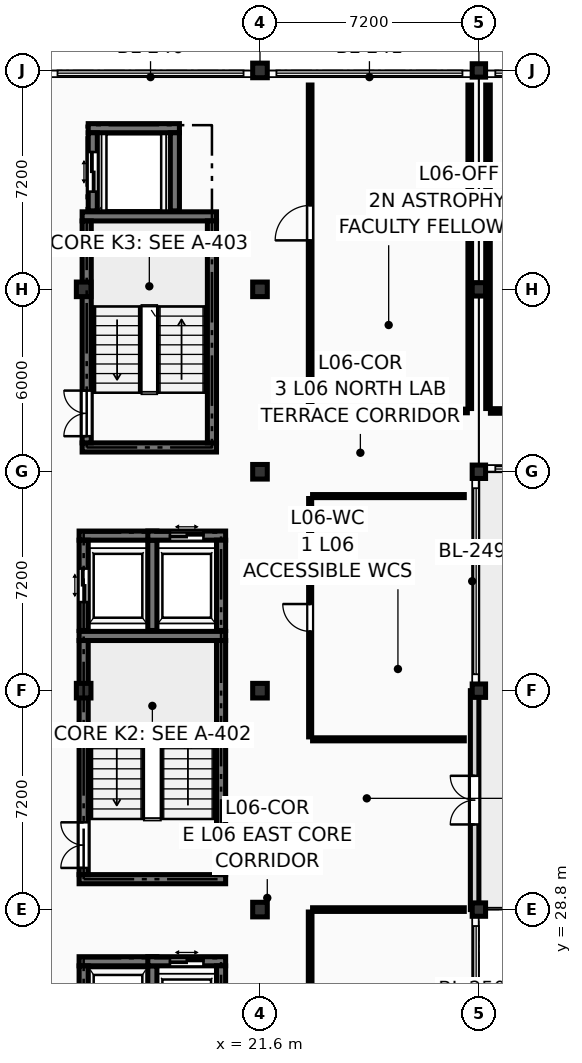
"""IFC4 building model, lengths in metres.
Left out: names, types, materials, properties, quantities, classifications, styles, units other than length and angle.
Written with IfcOpenShell. Run it as: python <this file> out.ifc"""

import sys

from ifc_helpers import new_model, si_unit, direction, frame, frame_2d, origin, origin_2d, place, context, subcontext, project, spatial, rectangle, extrude, element, fill, save


model = new_model("IFC4")
c1 = context("Model", 3, precision=1e-05, world=origin(), true_north=direction((0.0, 1.0)))
c2 = subcontext(c1, "Body", "Model", "MODEL_VIEW")
j1 = project(units=[si_unit("LENGTHUNIT", "METRE"), si_unit("PLANEANGLEUNIT", "RADIAN")], contexts=[c1])
p1 = place(None, origin())
s1 = spatial("IfcSite", under=j1, at=p1, CompositionType="ELEMENT")
p2 = place(p1, origin())
s2 = spatial("IfcBuilding", under=s1, at=p2, CompositionType="ELEMENT")
p3 = place(p2, frame((0.0, 0.0, 22.95)))
s3 = spatial("IfcBuildingStorey", under=s2, at=p3, CompositionType="ELEMENT", Elevation=22.95)
for number, where, z_axis, x_axis in (
    (1, (15.8, 36.0, 0.0), (0.0, 0.0, 1.0), (1.0, 0.0, 0.0)),
    (2, (15.8, 49.2, 0.0), (0.0, 0.0, 1.0), (1.0, 0.0, 0.0)),
    (3, (21.6, 28.8, 0.0), (0.0, 0.0, 1.0), (1.0, 0.0, 0.0)),
    (4, (21.6, 36.0, 0.0), (0.0, 0.0, 1.0), (1.0, 0.0, 0.0)),
    (5, (21.6, 43.2, 0.0), (0.0, 0.0, 1.0), (1.0, 0.0, 0.0)),
    (6, (21.6, 49.2, 0.0), (0.0, 0.0, 1.0), (1.0, 0.0, 0.0)),
    (7, (21.6, 56.4, 0.0), (0.0, 0.0, 1.0), (1.0, 0.0, 0.0)),
):
    element("IfcColumn", number, at=place(p3, frame(where, z_axis=z_axis, x_axis=x_axis)), inside=s3, PredefinedType="COLUMN", context=c2, shape_type="SweptSolid", body=[
        extrude(rectangle(XDim=0.48, YDim=0.48, at=origin_2d()), origin(), (0.0, 0.0, 1.0), 3.3),
    ])
for number, where, z_axis, x_axis in (
    (8, (28.8, 28.8, 0.0), (0.0, 0.0, 1.0), (1.0, 0.0, 0.0)),
    (9, (28.8, 36.0, 0.0), (0.0, 0.0, 1.0), (1.0, 0.0, 0.0)),
    (10, (28.8, 43.2, 0.0), (0.0, 0.0, 1.0), (1.0, 0.0, 0.0)),
    (11, (28.8, 49.2, 0.0), (0.0, 0.0, 1.0), (1.0, 0.0, 0.0)),
    (12, (28.8, 56.4, 0.0), (0.0, 0.0, 1.0), (1.0, 0.0, 0.0)),
):
    element("IfcColumn", number, at=place(p3, frame(where, z_axis=z_axis, x_axis=x_axis)), inside=s3, PredefinedType="COLUMN", context=c2, shape_type="SweptSolid", body=[
        extrude(rectangle(XDim=0.44, YDim=0.44, at=origin_2d()), origin(), (0.0, 0.0, 1.0), 3.3),
    ])
p4 = place(p3, frame((28.66, 28.8, 0.0), z_axis=(0.0, 0.0, 1.0), x_axis=(0.0, 1.0, 0.0)))
e13 = element("IfcWall", 13, at=p4, inside=s3, PredefinedType="SOLIDWALL", context=c2, shape_type="SweptSolid", body=[
    extrude(rectangle(XDim=7.2, YDim=0.28, at=frame_2d((3.6, 0.0))), origin(), (0.0, 0.0, 1.0), 2.54),
])
p5 = place(p4, frame((2.8, 0.0, 0.0)))
e14 = element("IfcOpeningElement", 14, at=p5, cuts=e13, PredefinedType="OPENING", context=c2, shape_type="SweptSolid", body=[
    extrude(rectangle(XDim=1.6, YDim=2.25, at=frame_2d((0.8, 1.125))), frame((0.0, 0.152, 0.0), z_axis=(0.0, -1.0, 0.0), x_axis=(1.0, 0.0, 0.0)), (0.0, 0.0, 1.0), 0.304),
])
for number, where, z_axis, x_axis in (
    (15, (15.65, 29.8, 0.0), (0.0, 0.0, 1.0), (1.0, 0.0, 0.0)),
    (16, (15.65, 37.8, 0.0), (0.0, 0.0, 1.0), (1.0, 0.0, 0.0)),
):
    element("IfcWall", number, at=place(p3, frame(where, z_axis=z_axis, x_axis=x_axis)), inside=s3, PredefinedType="SHEAR", context=c2, shape_type="SweptSolid", body=[
        extrude(rectangle(XDim=4.82, YDim=0.3, at=frame_2d((2.41, 0.0))), origin(), (0.0, 0.0, 1.0), 3.09),
    ])
p6 = place(p3, frame((15.8, 29.95, 0.0), z_axis=(0.0, 0.0, 1.0), x_axis=(0.0, 1.0, 0.0)))
e17 = element("IfcWall", 17, at=p6, inside=s3, PredefinedType="SHEAR", context=c2, shape_type="SweptSolid", body=[
    extrude(rectangle(XDim=7.7, YDim=0.3, at=frame_2d((3.85, 0.0))), origin(), (0.0, 0.0, 1.0), 3.09),
])
p7 = place(p6, frame((0.22, 0.0, 0.0)))
e18 = element("IfcOpeningElement", 18, at=p7, cuts=e17, PredefinedType="OPENING", context=c2, shape_type="SweptSolid", body=[
    extrude(rectangle(XDim=1.5, YDim=2.2, at=frame_2d((0.75, 1.1))), frame((0.0, 0.162, 0.0), z_axis=(0.0, -1.0, 0.0), x_axis=(1.0, 0.0, 0.0)), (0.0, 0.0, 1.0), 0.324),
])
p8 = place(p3, frame((20.32, 29.95, 0.0), z_axis=(0.0, 0.0, 1.0), x_axis=(0.0, 1.0, 0.0)))
e19 = element("IfcWall", 19, at=p8, inside=s3, PredefinedType="SHEAR", context=c2, shape_type="SweptSolid", body=[
    extrude(rectangle(XDim=7.7, YDim=0.3, at=frame_2d((3.85, 0.0))), origin(), (0.0, 0.0, 1.0), 3.09),
])
for number, where, z_axis, x_axis in (
    (20, (15.75, 44.0, 0.0), (0.0, 0.0, 1.0), (1.0, 0.0, 0.0)),
    (21, (15.75, 51.6, 0.0), (0.0, 0.0, 1.0), (1.0, 0.0, 0.0)),
):
    element("IfcWall", number, at=place(p3, frame(where, z_axis=z_axis, x_axis=x_axis)), inside=s3, PredefinedType="SHEAR", context=c2, shape_type="SweptSolid", body=[
        extrude(rectangle(XDim=4.42, YDim=0.3, at=frame_2d((2.21, 0.0))), origin(), (0.0, 0.0, 1.0), 3.09),
    ])
p9 = place(p3, frame((15.9, 44.15, 0.0), z_axis=(0.0, 0.0, 1.0), x_axis=(0.0, 1.0, 0.0)))
e22 = element("IfcWall", 22, at=p9, inside=s3, PredefinedType="SHEAR", context=c2, shape_type="SweptSolid", body=[
    extrude(rectangle(XDim=7.3, YDim=0.3, at=frame_2d((3.65, 0.0))), origin(), (0.0, 0.0, 1.0), 3.09),
])
p10 = place(p9, frame((0.22, 0.0, 0.0)))
e23 = element("IfcOpeningElement", 23, at=p10, cuts=e22, PredefinedType="OPENING", context=c2, shape_type="SweptSolid", body=[
    extrude(rectangle(XDim=1.5, YDim=2.2, at=frame_2d((0.75, 1.1))), frame((0.0, 0.162, 0.0), z_axis=(0.0, -1.0, 0.0), x_axis=(1.0, 0.0, 0.0)), (0.0, 0.0, 1.0), 0.324),
])
p11 = place(p3, frame((20.02, 44.15, 0.0), z_axis=(0.0, 0.0, 1.0), x_axis=(0.0, 1.0, 0.0)))
e24 = element("IfcWall", 24, at=p11, inside=s3, PredefinedType="SHEAR", context=c2, shape_type="SweptSolid", body=[
    extrude(rectangle(XDim=7.3, YDim=0.3, at=frame_2d((3.65, 0.0))), origin(), (0.0, 0.0, 1.0), 3.09),
])
p12 = place(p3, frame((15.65, 27.1, 0.0), z_axis=(0.0, 0.0, 1.0), x_axis=(1.0, 0.0, 0.0)))
e25 = element("IfcWall", 25, at=p12, inside=s3, PredefinedType="SHEAR", context=c2, shape_type="SweptSolid", body=[
    extrude(rectangle(XDim=2.56, YDim=0.3, at=frame_2d((1.28, 0.0))), origin(), (0.0, 0.0, 1.0), 3.09),
])
p13 = place(p3, frame((15.8, 23.98, 0.0), z_axis=(0.0, 0.0, 1.0), x_axis=(0.0, 1.0, 0.0)))
e26 = element("IfcWall", 26, at=p13, inside=s3, PredefinedType="SHEAR", context=c2, shape_type="SweptSolid", body=[
    extrude(rectangle(XDim=2.97, YDim=0.3, at=frame_2d((1.485, 0.0))), origin(), (0.0, 0.0, 1.0), 3.09),
])
p14 = place(p13, frame((0.835, 0.0, 0.0)))
e27 = element("IfcOpeningElement", 27, at=p14, cuts=e26, PredefinedType="OPENING", context=c2, shape_type="SweptSolid", body=[
    extrude(rectangle(XDim=1.3, YDim=2.25, at=frame_2d((0.65, 1.125))), frame((0.0, 0.162, 0.0), z_axis=(0.0, -1.0, 0.0), x_axis=(1.0, 0.0, 0.0)), (0.0, 0.0, 1.0), 0.324),
])
p15 = place(p3, frame((18.06, 23.98, 0.0), z_axis=(0.0, 0.0, 1.0), x_axis=(0.0, 1.0, 0.0)))
e28 = element("IfcWall", 28, at=p15, inside=s3, PredefinedType="SHEAR", context=c2, shape_type="SweptSolid", body=[
    extrude(rectangle(XDim=2.97, YDim=0.3, at=frame_2d((1.485, 0.0))), origin(), (0.0, 0.0, 1.0), 3.09),
])
p16 = place(p3, frame((17.91, 27.1, 0.0), z_axis=(0.0, 0.0, 1.0), x_axis=(1.0, 0.0, 0.0)))
e29 = element("IfcWall", 29, at=p16, inside=s3, PredefinedType="SHEAR", context=c2, shape_type="SweptSolid", body=[
    extrude(rectangle(XDim=2.56, YDim=0.3, at=frame_2d((1.28, 0.0))), origin(), (0.0, 0.0, 1.0), 3.09),
])
p17 = place(p16, frame((0.73, 0.0, 0.0)))
e30 = element("IfcOpeningElement", 30, at=p17, cuts=e29, PredefinedType="OPENING", context=c2, shape_type="SweptSolid", body=[
    extrude(rectangle(XDim=1.1, YDim=2.2, at=frame_2d((0.55, 1.1))), frame((0.0, 0.162, 0.0), z_axis=(0.0, -1.0, 0.0), x_axis=(1.0, 0.0, 0.0)), (0.0, 0.0, 1.0), 0.324),
])
p18 = place(p3, frame((20.32, 23.98, 0.0), z_axis=(0.0, 0.0, 1.0), x_axis=(0.0, 1.0, 0.0)))
e31 = element("IfcWall", 31, at=p18, inside=s3, PredefinedType="SHEAR", context=c2, shape_type="SweptSolid", body=[
    extrude(rectangle(XDim=2.97, YDim=0.3, at=frame_2d((1.485, 0.0))), origin(), (0.0, 0.0, 1.0), 3.09),
])
p19 = place(p3, frame((15.65, 41.1, 0.0), z_axis=(0.0, 0.0, 1.0), x_axis=(1.0, 0.0, 0.0)))
e32 = element("IfcWall", 32, at=p19, inside=s3, PredefinedType="SHEAR", context=c2, shape_type="SweptSolid", body=[
    extrude(rectangle(XDim=2.56, YDim=0.3, at=frame_2d((1.28, 0.0))), origin(), (0.0, 0.0, 1.0), 3.09),
])
p20 = place(p3, frame((15.8, 37.98, 0.0), z_axis=(0.0, 0.0, 1.0), x_axis=(0.0, 1.0, 0.0)))
e33 = element("IfcWall", 33, at=p20, inside=s3, PredefinedType="SHEAR", context=c2, shape_type="SweptSolid", body=[
    extrude(rectangle(XDim=2.97, YDim=0.3, at=frame_2d((1.485, 0.0))), origin(), (0.0, 0.0, 1.0), 3.09),
])
p21 = place(p20, frame((0.935, 0.0, 0.0)))
e34 = element("IfcOpeningElement", 34, at=p21, cuts=e33, PredefinedType="OPENING", context=c2, shape_type="SweptSolid", body=[
    extrude(rectangle(XDim=1.1, YDim=2.2, at=frame_2d((0.55, 1.1))), frame((0.0, 0.162, 0.0), z_axis=(0.0, -1.0, 0.0), x_axis=(1.0, 0.0, 0.0)), (0.0, 0.0, 1.0), 0.324),
])
p22 = place(p3, frame((18.06, 37.98, 0.0), z_axis=(0.0, 0.0, 1.0), x_axis=(0.0, 1.0, 0.0)))
e35 = element("IfcWall", 35, at=p22, inside=s3, PredefinedType="SHEAR", context=c2, shape_type="SweptSolid", body=[
    extrude(rectangle(XDim=2.97, YDim=0.3, at=frame_2d((1.485, 0.0))), origin(), (0.0, 0.0, 1.0), 3.09),
])
p23 = place(p3, frame((17.91, 41.1, 0.0), z_axis=(0.0, 0.0, 1.0), x_axis=(1.0, 0.0, 0.0)))
e36 = element("IfcWall", 36, at=p23, inside=s3, PredefinedType="SHEAR", context=c2, shape_type="SweptSolid", body=[
    extrude(rectangle(XDim=2.56, YDim=0.3, at=frame_2d((1.28, 0.0))), origin(), (0.0, 0.0, 1.0), 3.09),
])
p24 = place(p23, frame((0.73, 0.0, 0.0)))
e37 = element("IfcOpeningElement", 37, at=p24, cuts=e36, PredefinedType="OPENING", context=c2, shape_type="SweptSolid", body=[
    extrude(rectangle(XDim=1.1, YDim=2.2, at=frame_2d((0.55, 1.1))), frame((0.0, 0.162, 0.0), z_axis=(0.0, -1.0, 0.0), x_axis=(1.0, 0.0, 0.0)), (0.0, 0.0, 1.0), 0.324),
])
p25 = place(p3, frame((20.32, 37.98, 0.0), z_axis=(0.0, 0.0, 1.0), x_axis=(0.0, 1.0, 0.0)))
e38 = element("IfcWall", 38, at=p25, inside=s3, PredefinedType="SHEAR", context=c2, shape_type="SweptSolid", body=[
    extrude(rectangle(XDim=2.97, YDim=0.3, at=frame_2d((1.485, 0.0))), origin(), (0.0, 0.0, 1.0), 3.09),
])
p26 = place(p3, frame((15.95, 54.5, 0.0), z_axis=(0.0, 0.0, 1.0), x_axis=(1.0, 0.0, 0.0)))
e39 = element("IfcWall", 39, at=p26, inside=s3, PredefinedType="SHEAR", context=c2, shape_type="SweptSolid", body=[
    extrude(rectangle(XDim=3.0, YDim=0.3, at=frame_2d((1.5, 0.0))), origin(), (0.0, 0.0, 1.0), 3.09),
])
p27 = place(p3, frame((16.1, 51.78, 0.0), z_axis=(0.0, 0.0, 1.0), x_axis=(0.0, 1.0, 0.0)))
e40 = element("IfcWall", 40, at=p27, inside=s3, PredefinedType="SHEAR", context=c2, shape_type="SweptSolid", body=[
    extrude(rectangle(XDim=2.57, YDim=0.3, at=frame_2d((1.285, 0.0))), origin(), (0.0, 0.0, 1.0), 3.09),
])
p28 = place(p27, frame((0.635, 0.0, 0.0)))
e41 = element("IfcOpeningElement", 41, at=p28, cuts=e40, PredefinedType="OPENING", context=c2, shape_type="SweptSolid", body=[
    extrude(rectangle(XDim=1.3, YDim=2.25, at=frame_2d((0.65, 1.125))), frame((0.0, 0.162, 0.0), z_axis=(0.0, -1.0, 0.0), x_axis=(1.0, 0.0, 0.0)), (0.0, 0.0, 1.0), 0.324),
])
p29 = place(p3, frame((18.8, 51.78, 0.0), z_axis=(0.0, 0.0, 1.0), x_axis=(0.0, 1.0, 0.0)))
e42 = element("IfcWall", 42, at=p29, inside=s3, PredefinedType="SHEAR", context=c2, shape_type="SweptSolid", body=[
    extrude(rectangle(XDim=2.57, YDim=0.3, at=frame_2d((1.285, 0.0))), origin(), (0.0, 0.0, 1.0), 3.09),
])
p30 = place(p3, frame((23.25, 14.88, 0.0), z_axis=(0.0, 0.0, 1.0), x_axis=(0.0, 1.0, 0.0)))
e43 = element("IfcWall", 43, at=p30, inside=s3, PredefinedType="PARTITIONING", context=c2, shape_type="SweptSolid", body=[
    extrude(rectangle(XDim=13.84, YDim=0.12, at=frame_2d((6.92, 0.0))), origin(), (0.0, 0.0, 1.0), 3.075),
])
p31 = place(p30, frame((8.387, 0.0, 0.0)))
e44 = element("IfcOpeningElement", 44, at=p31, cuts=e43, PredefinedType="OPENING", context=c2, shape_type="SweptSolid", body=[
    extrude(rectangle(XDim=1.15, YDim=2.18, at=frame_2d((0.575, 1.09))), frame((0.0, 0.072, 0.0), z_axis=(0.0, -1.0, 0.0), x_axis=(1.0, 0.0, 0.0)), (0.0, 0.0, 1.0), 0.144),
])
p32 = place(p3, frame((23.33, 28.8, 0.0), z_axis=(0.0, 0.0, 1.0), x_axis=(1.0, 0.0, 0.0)))
e45 = element("IfcWall", 45, at=p32, inside=s3, PredefinedType="PARTITIONING", context=c2, shape_type="SweptSolid", body=[
    extrude(rectangle(XDim=4.99, YDim=0.12, at=frame_2d((2.495, 0.0))), origin(), (0.0, 0.0, 1.0), 2.415),
])
p33 = place(p3, frame((23.25, 34.48, 0.0), z_axis=(0.0, 0.0, 1.0), x_axis=(0.0, 1.0, 0.0)))
e46 = element("IfcWall", 46, at=p33, inside=s3, PredefinedType="PARTITIONING", context=c2, shape_type="SweptSolid", body=[
    extrude(rectangle(XDim=7.84, YDim=0.1, at=frame_2d((3.92, 0.0))), origin(), (0.0, 0.0, 1.0), 3.075),
])
p34 = place(p33, frame((3.47, 0.0, 0.0)))
e47 = element("IfcOpeningElement", 47, at=p34, cuts=e46, PredefinedType="OPENING", context=c2, shape_type="SweptSolid", body=[
    extrude(rectangle(XDim=0.9, YDim=2.1, at=frame_2d((0.45, 1.05))), frame((0.0, 0.062, 0.0), z_axis=(0.0, -1.0, 0.0), x_axis=(1.0, 0.0, 0.0)), (0.0, 0.0, 1.0), 0.124),
])
for number, where, z_axis, x_axis in (
    (48, (23.33, 34.4, 0.0), (0.0, 0.0, 1.0), (1.0, 0.0, 0.0)),
    (49, (23.33, 42.4, 0.0), (0.0, 0.0, 1.0), (1.0, 0.0, 0.0)),
):
    element("IfcWall", number, at=place(p3, frame(where, z_axis=z_axis, x_axis=x_axis)), inside=s3, PredefinedType="PARTITIONING", context=c2, shape_type="SweptSolid", body=[
        extrude(rectangle(XDim=4.99, YDim=0.1, at=frame_2d((2.495, 0.0))), origin(), (0.0, 0.0, 1.0), 3.075),
    ])
p35 = place(p3, frame((23.25, 45.28, 0.0), z_axis=(0.0, 0.0, 1.0), x_axis=(0.0, 1.0, 0.0)))
e50 = element("IfcWall", 50, at=p35, inside=s3, PredefinedType="PARTITIONING", context=c2, shape_type="SweptSolid", body=[
    extrude(rectangle(XDim=10.64, YDim=0.12, at=frame_2d((5.32, 0.0))), origin(), (0.0, 0.0, 1.0), 3.075),
])
p36 = place(p35, frame((5.531, 0.0, 0.0)))
e51 = element("IfcOpeningElement", 51, at=p36, cuts=e50, PredefinedType="OPENING", context=c2, shape_type="SweptSolid", body=[
    extrude(rectangle(XDim=1.15, YDim=2.18, at=frame_2d((0.575, 1.09))), frame((0.0, 0.072, 0.0), z_axis=(0.0, -1.0, 0.0), x_axis=(1.0, 0.0, 0.0)), (0.0, 0.0, 1.0), 0.144),
])
p37 = place(p3, frame((23.33, 45.2, 0.0), z_axis=(0.0, 0.0, 1.0), x_axis=(1.0, 0.0, 0.0)))
e52 = element("IfcWall", 52, at=p37, inside=s3, PredefinedType="PARTITIONING", context=c2, shape_type="SweptSolid", body=[
    extrude(rectangle(XDim=5.09, YDim=0.12, at=frame_2d((2.545, 0.0))), origin(), (0.0, 0.0, 1.0), 3.075),
])
p38 = place(p3, frame((28.5, 45.28, 0.0), z_axis=(0.0, 0.0, 1.0), x_axis=(0.0, 1.0, 0.0)))
e53 = element("IfcWall", 53, at=p38, inside=s3, PredefinedType="PARTITIONING", context=c2, shape_type="SweptSolid", body=[
    extrude(rectangle(XDim=10.64, YDim=0.12, at=frame_2d((5.32, 0.0))), origin(), (0.0, 0.0, 1.0), 2.415),
])
p39 = place(p3, frame((29.1, 45.28, 0.0), z_axis=(0.0, 0.0, 1.0), x_axis=(0.0, 1.0, 0.0)))
e54 = element("IfcWall", 54, at=p39, inside=s3, PredefinedType="PARTITIONING", context=c2, shape_type="SweptSolid", body=[
    extrude(rectangle(XDim=10.64, YDim=0.15, at=frame_2d((5.32, 0.0))), origin(), (0.0, 0.0, 1.0), 2.415),
])
p40 = place(p3, frame((29.18, 45.2, 0.0), z_axis=(0.0, 0.0, 1.0), x_axis=(1.0, 0.0, 0.0)))
e55 = element("IfcWall", 55, at=p40, inside=s3, PredefinedType="PARTITIONING", context=c2, shape_type="SweptSolid", body=[
    extrude(rectangle(XDim=8.54, YDim=0.15, at=frame_2d((4.27, 0.0))), origin(), (0.0, 0.0, 1.0), 3.075),
])
p41 = place(p40, frame((3.56, 0.0, 0.0)))
e56 = element("IfcOpeningElement", 56, at=p41, cuts=e55, PredefinedType="OPENING", context=c2, shape_type="SweptSolid", body=[
    extrude(rectangle(XDim=1.42, YDim=2.22, at=frame_2d((0.71, 1.11))), frame((0.0, 0.087, 0.0), z_axis=(0.0, -1.0, 0.0), x_axis=(1.0, 0.0, 0.0)), (0.0, 0.0, 1.0), 0.174),
])
p42 = place(p5, origin())
e57 = element("IfcDoor", 57, at=p42, inside=s3, OperationType="DOUBLE_DOOR_SINGLE_SWING", PredefinedType="DOOR", context=c2, shape_type="SweptSolid", body=[
    extrude(rectangle(XDim=1.6, YDim=2.25, at=frame_2d((0.8, 1.125))), frame((0.0, 0.025, 0.0), z_axis=(0.0, -1.0, 0.0), x_axis=(1.0, 0.0, 0.0)), (0.0, 0.0, 1.0), 0.05),
])
fill(e14, e57)
p43 = place(p7, origin())
e58 = element("IfcDoor", 58, at=p43, inside=s3, OperationType="DOUBLE_DOOR_SINGLE_SWING", PredefinedType="DOOR", context=c2, shape_type="SweptSolid", body=[
    extrude(rectangle(XDim=1.5, YDim=2.2, at=frame_2d((0.75, 1.1))), frame((0.0, 0.025, 0.0), z_axis=(0.0, -1.0, 0.0), x_axis=(1.0, 0.0, 0.0)), (0.0, 0.0, 1.0), 0.05),
])
fill(e18, e58)
p44 = place(p10, origin())
e59 = element("IfcDoor", 59, at=p44, inside=s3, OperationType="DOUBLE_DOOR_SINGLE_SWING", PredefinedType="DOOR", context=c2, shape_type="SweptSolid", body=[
    extrude(rectangle(XDim=1.5, YDim=2.2, at=frame_2d((0.75, 1.1))), frame((0.0, 0.025, 0.0), z_axis=(0.0, -1.0, 0.0), x_axis=(1.0, 0.0, 0.0)), (0.0, 0.0, 1.0), 0.05),
])
fill(e23, e59)
p45 = place(p17, origin())
e60 = element("IfcDoor", 60, at=p45, inside=s3, OperationType="DOUBLE_DOOR_SLIDING", PredefinedType="DOOR", context=c2, shape_type="SweptSolid", body=[
    extrude(rectangle(XDim=1.1, YDim=2.2, at=frame_2d((0.55, 1.1))), frame((0.0, 0.025, 0.0), z_axis=(0.0, -1.0, 0.0), x_axis=(1.0, 0.0, 0.0)), (0.0, 0.0, 1.0), 0.05),
])
fill(e30, e60)
p46 = place(p21, origin())
e61 = element("IfcDoor", 61, at=p46, inside=s3, OperationType="DOUBLE_DOOR_SLIDING", PredefinedType="DOOR", context=c2, shape_type="SweptSolid", body=[
    extrude(rectangle(XDim=1.1, YDim=2.2, at=frame_2d((0.55, 1.1))), frame((0.0, 0.025, 0.0), z_axis=(0.0, -1.0, 0.0), x_axis=(1.0, 0.0, 0.0)), (0.0, 0.0, 1.0), 0.05),
])
fill(e34, e61)
p47 = place(p24, origin())
e62 = element("IfcDoor", 62, at=p47, inside=s3, OperationType="DOUBLE_DOOR_SLIDING", PredefinedType="DOOR", context=c2, shape_type="SweptSolid", body=[
    extrude(rectangle(XDim=1.1, YDim=2.2, at=frame_2d((0.55, 1.1))), frame((0.0, 0.025, 0.0), z_axis=(0.0, -1.0, 0.0), x_axis=(1.0, 0.0, 0.0)), (0.0, 0.0, 1.0), 0.05),
])
fill(e37, e62)
p48 = place(p28, origin())
e63 = element("IfcDoor", 63, at=p48, inside=s3, OperationType="DOUBLE_DOOR_SLIDING", PredefinedType="DOOR", context=c2, shape_type="SweptSolid", body=[
    extrude(rectangle(XDim=1.3, YDim=2.25, at=frame_2d((0.65, 1.125))), frame((0.0, 0.025, 0.0), z_axis=(0.0, -1.0, 0.0), x_axis=(1.0, 0.0, 0.0)), (0.0, 0.0, 1.0), 0.05),
])
fill(e41, e63)
p49 = place(p34, origin())
e64 = element("IfcDoor", 64, at=p49, inside=s3, OperationType="SINGLE_SWING_RIGHT", PredefinedType="DOOR", context=c2, shape_type="SweptSolid", body=[
    extrude(rectangle(XDim=0.9, YDim=2.1, at=frame_2d((0.45, 1.05))), frame((0.0, 0.025, 0.0), z_axis=(0.0, -1.0, 0.0), x_axis=(1.0, 0.0, 0.0)), (0.0, 0.0, 1.0), 0.05),
])
fill(e47, e64)
p50 = place(p36, origin())
e65 = element("IfcDoor", 65, at=p50, inside=s3, OperationType="SINGLE_SWING_LEFT", PredefinedType="DOOR", context=c2, shape_type="SweptSolid", body=[
    extrude(rectangle(XDim=1.15, YDim=2.18, at=frame_2d((0.575, 1.09))), frame((0.0, 0.025, 0.0), z_axis=(0.0, -1.0, 0.0), x_axis=(1.0, 0.0, 0.0)), (0.0, 0.0, 1.0), 0.05),
])
fill(e51, e65)
save(model, sys.argv[1])
